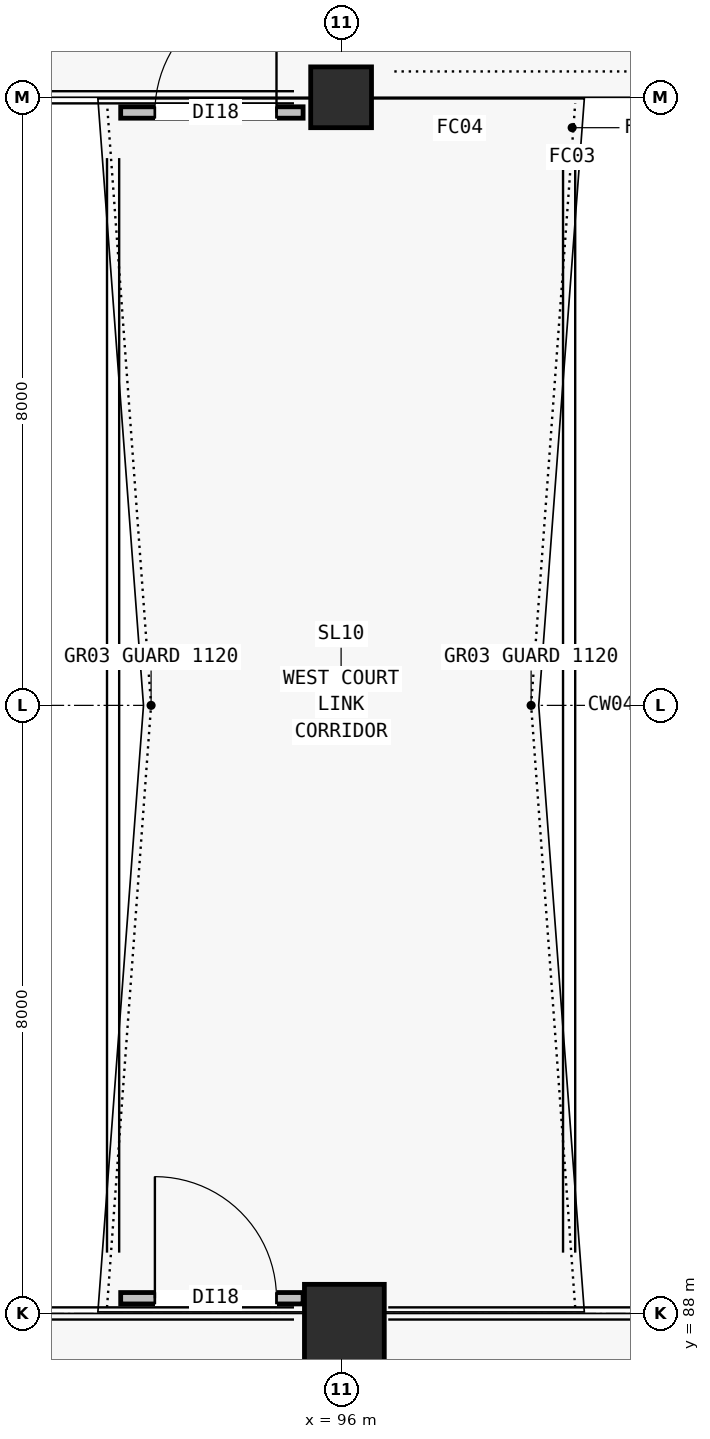
"""IFC4 building model, lengths in metres.
Left out: names, types, materials, properties, quantities, classifications, styles, units other than length and angle.
Written with IfcOpenShell. Run it as: python <this file> out.ifc"""

import sys

from ifc_helpers import new_model, si_unit, direction, frame, frame_2d, origin, origin_2d, place, context, subcontext, project, spatial, rectangle, extrude, element, fill, save


model = new_model("IFC4")
c1 = context("Model", 3, precision=1e-05, world=origin(), true_north=direction((0.0, 1.0)))
c2 = subcontext(c1, "Body", "Model", "MODEL_VIEW")
j1 = project(units=[si_unit("LENGTHUNIT", "METRE"), si_unit("PLANEANGLEUNIT", "RADIAN")], contexts=[c1])
p1 = place(None, origin())
s1 = spatial("IfcSite", under=j1, at=p1, CompositionType="ELEMENT")
p2 = place(p1, origin())
s2 = spatial("IfcBuilding", under=s1, at=p2, CompositionType="ELEMENT")
p3 = place(p2, frame((0.0, 0.0, 5.6)))
s3 = spatial("IfcBuildingStorey", under=s2, at=p3, CompositionType="ELEMENT", Elevation=5.6)
p4 = place(p3, frame((96.043, 87.858, 0.0), z_axis=(0.0, 0.0, 1.0), x_axis=(1.0, 0.0, 0.0)))
e1 = element("IfcColumn", 1, at=p4, inside=s3, PredefinedType="COLUMN", context=c2, shape_type="SweptSolid", body=[
    extrude(rectangle(XDim=1.05, YDim=1.05, at=origin_2d()), origin(), (0.0, 0.0, 1.0), 3.835),
])
p5 = place(p3, frame((96.0, 104.0, 0.0), z_axis=(0.0, 0.0, 1.0), x_axis=(1.0, 0.0, 0.0)))
e2 = element("IfcColumn", 2, at=p5, inside=s3, PredefinedType="COLUMN", context=c2, shape_type="SweptSolid", body=[
    extrude(rectangle(XDim=0.8, YDim=0.8, at=origin_2d()), origin(), (0.0, 0.0, 1.0), 3.9),
])
p6 = place(p3, frame((93.1, 88.2, 0.0), z_axis=(0.0, 0.0, 1.0), x_axis=(1.0, 0.0, 0.0)))
e3 = element("IfcWall", 3, at=p6, inside=s3, PredefinedType="PARTITIONING", context=c2, shape_type="SweptSolid", body=[
    extrude(rectangle(XDim=2.4, YDim=0.15, at=frame_2d((1.2, 0.0))), origin(), (0.0, 0.0, 1.0), 2.48),
])
p7 = place(p6, frame((0.45, 0.0, 0.0)))
e4 = element("IfcOpeningElement", 4, at=p7, cuts=e3, PredefinedType="OPENING", context=c2, shape_type="SweptSolid", body=[
    extrude(rectangle(XDim=1.6, YDim=2.2, at=frame_2d((0.8, 1.1))), frame((0.0, 0.085, 0.0), z_axis=(0.0, -1.0, 0.0), x_axis=(1.0, 0.0, 0.0)), (0.0, 0.0, 1.0), 0.17),
])
p8 = place(p3, frame((93.1, 103.8, 0.0), z_axis=(0.0, 0.0, 1.0), x_axis=(1.0, 0.0, 0.0)))
e5 = element("IfcWall", 5, at=p8, inside=s3, PredefinedType="PARTITIONING", context=c2, shape_type="SweptSolid", body=[
    extrude(rectangle(XDim=2.4, YDim=0.15, at=frame_2d((1.2, 0.0))), origin(), (0.0, 0.0, 1.0), 2.48),
])
p9 = place(p8, frame((0.45, 0.0, 0.0)))
e6 = element("IfcOpeningElement", 6, at=p9, cuts=e5, PredefinedType="OPENING", context=c2, shape_type="SweptSolid", body=[
    extrude(rectangle(XDim=1.6, YDim=2.2, at=frame_2d((0.8, 1.1))), frame((0.0, 0.085, 0.0), z_axis=(0.0, -1.0, 0.0), x_axis=(1.0, 0.0, 0.0)), (0.0, 0.0, 1.0), 0.17),
])
p10 = place(p7, origin())
e7 = element("IfcDoor", 7, at=p10, inside=s3, OperationType="SINGLE_SWING_LEFT", PredefinedType="DOOR", context=c2, shape_type="SweptSolid", body=[
    extrude(rectangle(XDim=1.6, YDim=2.2, at=frame_2d((0.8, 1.1))), frame((0.0, 0.025, 0.0), z_axis=(0.0, -1.0, 0.0), x_axis=(1.0, 0.0, 0.0)), (0.0, 0.0, 1.0), 0.05),
])
fill(e4, e7)
p11 = place(p9, origin())
e8 = element("IfcDoor", 8, at=p11, inside=s3, OperationType="SINGLE_SWING_RIGHT", PredefinedType="DOOR", context=c2, shape_type="SweptSolid", body=[
    extrude(rectangle(XDim=1.6, YDim=2.2, at=frame_2d((0.8, 1.1))), frame((0.0, 0.025, 0.0), z_axis=(0.0, -1.0, 0.0), x_axis=(1.0, 0.0, 0.0)), (0.0, 0.0, 1.0), 0.05),
])
fill(e6, e8)
save(model, sys.argv[1])
